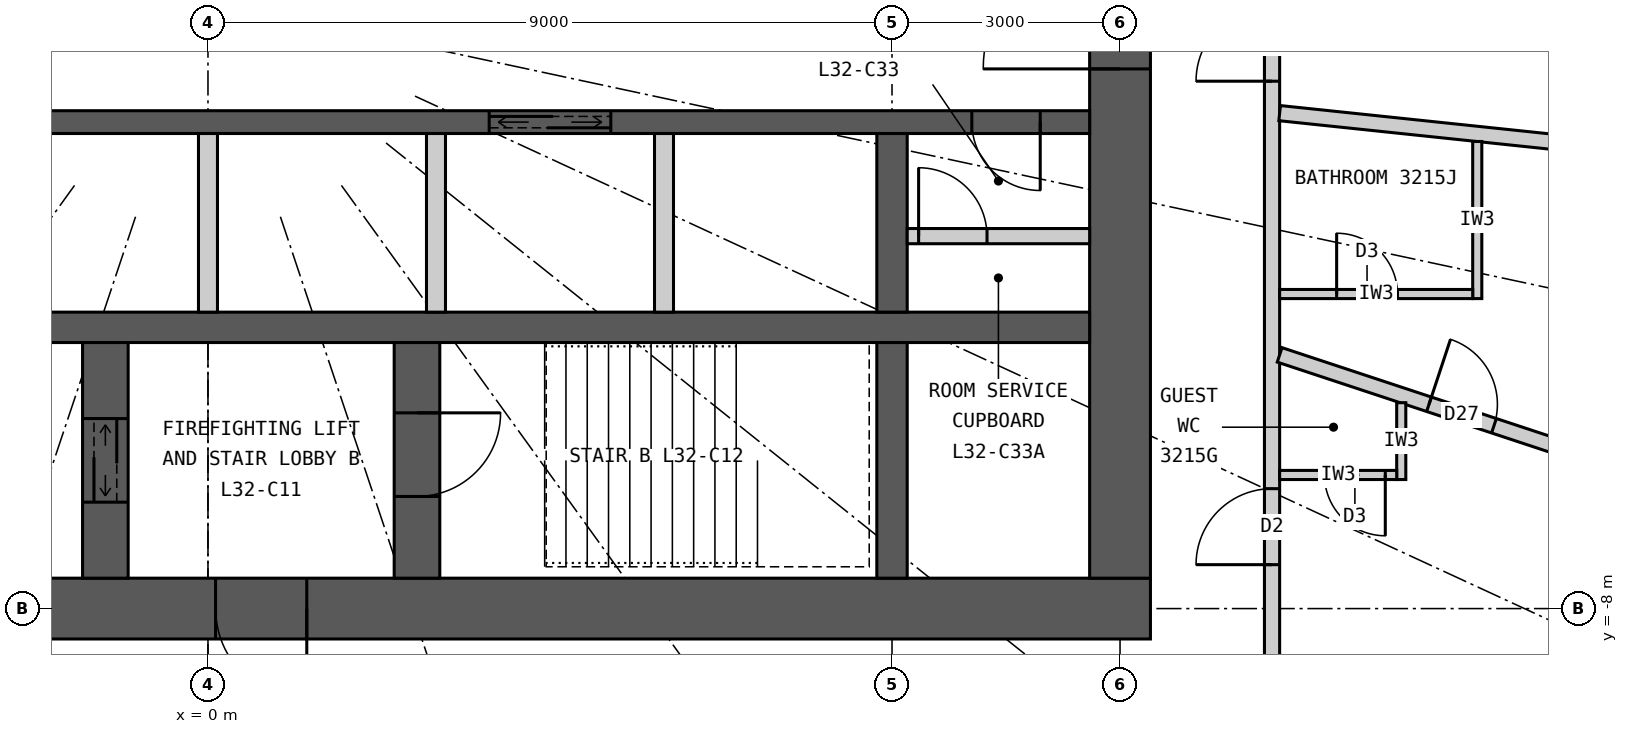
"""IFC4 building model, lengths in metres.
Left out: names, types, materials, properties, quantities, classifications, styles, units other than length and angle.
Written with IfcOpenShell. Run it as: python <this file> out.ifc"""

import sys

from ifc_helpers import new_model, si_unit, direction, frame, frame_2d, origin, place, context, subcontext, project, spatial, rectangle, extrude, element, fill, save


model = new_model("IFC4")
c1 = context("Model", 3, precision=1e-05, world=origin(), true_north=direction((0.0, 1.0)))
c2 = subcontext(c1, "Body", "Model", "MODEL_VIEW")
j1 = project(units=[si_unit("LENGTHUNIT", "METRE"), si_unit("PLANEANGLEUNIT", "RADIAN")], contexts=[c1])
p1 = place(None, origin())
s1 = spatial("IfcSite", under=j1, at=p1, CompositionType="ELEMENT")
p2 = place(p1, origin())
s2 = spatial("IfcBuilding", under=s1, at=p2, CompositionType="ELEMENT")
p3 = place(p2, frame((0.0, 0.0, 125.4)))
s3 = spatial("IfcBuildingStorey", under=s2, at=p3, CompositionType="ELEMENT", Elevation=125.4)
p4 = place(p3, frame((12.4, -8.0, 0.0), z_axis=(0.0, 0.0, 1.0), x_axis=(-1.0, 0.0, 0.0)))
e1 = element("IfcWall", 1, at=p4, inside=s3, PredefinedType="SHEAR", context=c2, shape_type="SweptSolid", body=[
    extrude(rectangle(XDim=24.8, YDim=0.8, at=frame_2d((12.4, 0.0))), origin(), (0.0, 0.0, 1.0), 3.3),
])
p5 = place(p4, frame((11.1, 0.0, 0.0)))
e2 = element("IfcOpeningElement", 2, at=p5, cuts=e1, PredefinedType="OPENING", context=c2, shape_type="SweptSolid", body=[
    extrude(rectangle(XDim=1.2, YDim=2.2, at=frame_2d((0.6, 1.1))), frame((0.0, 0.41, 0.0), z_axis=(0.0, -1.0, 0.0), x_axis=(1.0, 0.0, 0.0)), (0.0, 0.0, 1.0), 0.82),
])
p6 = place(p4, frame((18.7, 0.0, 0.0)))
e3 = element("IfcOpeningElement", 3, at=p6, cuts=e1, PredefinedType="OPENING", context=c2, shape_type="SweptSolid", body=[
    extrude(rectangle(XDim=0.9, YDim=2.2, at=frame_2d((0.45, 1.1))), frame((0.0, 0.41, 0.0), z_axis=(0.0, -1.0, 0.0), x_axis=(1.0, 0.0, 0.0)), (0.0, 0.0, 1.0), 0.82),
])
p7 = place(p3, frame((12.0, -7.6, 0.0), z_axis=(0.0, 0.0, 1.0), x_axis=(0.0, 1.0, 0.0)))
e4 = element("IfcWall", 4, at=p7, inside=s3, PredefinedType="SHEAR", context=c2, shape_type="SweptSolid", body=[
    extrude(rectangle(XDim=15.2, YDim=0.8, at=frame_2d((7.6, 0.0))), origin(), (0.0, 0.0, 1.0), 3.3),
])
p8 = place(p7, frame((6.7, 0.0, 0.0)))
e5 = element("IfcOpeningElement", 5, at=p8, cuts=e4, PredefinedType="OPENING", context=c2, shape_type="SweptSolid", body=[
    extrude(rectangle(XDim=1.8, YDim=2.2, at=frame_2d((0.9, 1.1))), frame((0.0, 0.41, 0.0), z_axis=(0.0, -1.0, 0.0), x_axis=(1.0, 0.0, 0.0)), (0.0, 0.0, 1.0), 0.82),
])
p9 = place(p3, frame((-11.6, -4.3, 0.0), z_axis=(0.0, 0.0, 1.0), x_axis=(1.0, 0.0, 0.0)))
e6 = element("IfcWall", 6, at=p9, inside=s3, PredefinedType="SHEAR", context=c2, shape_type="SweptSolid", body=[
    extrude(rectangle(XDim=23.2, YDim=0.4, at=frame_2d((11.6, 0.0))), origin(), (0.0, 0.0, 1.0), 3.3),
])
p10 = place(p3, frame((-11.6, -1.6, 0.0), z_axis=(0.0, 0.0, 1.0), x_axis=(1.0, 0.0, 0.0)))
e7 = element("IfcWall", 7, at=p10, inside=s3, PredefinedType="SHEAR", context=c2, shape_type="SweptSolid", body=[
    extrude(rectangle(XDim=23.2, YDim=0.3, at=frame_2d((11.6, 0.0))), origin(), (0.0, 0.0, 1.0), 3.3),
])
p11 = place(p10, frame((6.55, 0.0, 0.0)))
e8 = element("IfcOpeningElement", 8, at=p11, cuts=e7, PredefinedType="OPENING", context=c2, shape_type="SweptSolid", body=[
    extrude(rectangle(XDim=1.1, YDim=2.2, at=frame_2d((0.55, 1.1))), frame((0.0, 0.16, 0.0), z_axis=(0.0, -1.0, 0.0), x_axis=(1.0, 0.0, 0.0)), (0.0, 0.0, 1.0), 0.32),
])
p12 = place(p10, frame((15.3, 0.0, 0.0)))
e9 = element("IfcOpeningElement", 9, at=p12, cuts=e7, PredefinedType="OPENING", context=c2, shape_type="SweptSolid", body=[
    extrude(rectangle(XDim=1.6, YDim=2.4, at=frame_2d((0.8, 1.2))), frame((0.0, 0.16, 0.0), z_axis=(0.0, -1.0, 0.0), x_axis=(1.0, 0.0, 0.0)), (0.0, 0.0, 1.0), 0.32),
])
p13 = place(p10, frame((0.65, 0.0, 0.0)))
e10 = element("IfcOpeningElement", 10, at=p13, cuts=e7, PredefinedType="OPENING", context=c2, shape_type="SweptSolid", body=[
    extrude(rectangle(XDim=0.9, YDim=2.2, at=frame_2d((0.45, 1.1))), frame((0.0, 0.16, 0.0), z_axis=(0.0, -1.0, 0.0), x_axis=(1.0, 0.0, 0.0)), (0.0, 0.0, 1.0), 0.32),
])
p14 = place(p10, frame((3.65, 0.0, 0.0)))
e11 = element("IfcOpeningElement", 11, at=p14, cuts=e7, PredefinedType="OPENING", context=c2, shape_type="SweptSolid", body=[
    extrude(rectangle(XDim=0.9, YDim=2.2, at=frame_2d((0.45, 1.1))), frame((0.0, 0.16, 0.0), z_axis=(0.0, -1.0, 0.0), x_axis=(1.0, 0.0, 0.0)), (0.0, 0.0, 1.0), 0.32),
])
p15 = place(p10, frame((21.65, 0.0, 0.0)))
e12 = element("IfcOpeningElement", 12, at=p15, cuts=e7, PredefinedType="OPENING", context=c2, shape_type="SweptSolid", body=[
    extrude(rectangle(XDim=0.9, YDim=2.2, at=frame_2d((0.45, 1.1))), frame((0.0, 0.16, 0.0), z_axis=(0.0, -1.0, 0.0), x_axis=(1.0, 0.0, 0.0)), (0.0, 0.0, 1.0), 0.32),
])
p16 = place(p3, frame((9.0, -4.1, 0.0), z_axis=(0.0, 0.0, 1.0), x_axis=(0.0, 1.0, 0.0)))
e13 = element("IfcWall", 13, at=p16, inside=s3, PredefinedType="SHEAR", context=c2, shape_type="SweptSolid", body=[
    extrude(rectangle(XDim=2.35, YDim=0.4, at=frame_2d((1.175, 0.0))), origin(), (0.0, 0.0, 1.0), 3.3),
])
p17 = place(p3, frame((9.0, -7.6, 0.0), z_axis=(0.0, 0.0, 1.0), x_axis=(0.0, 1.0, 0.0)))
e14 = element("IfcWall", 14, at=p17, inside=s3, PredefinedType="SHEAR", context=c2, shape_type="SweptSolid", body=[
    extrude(rectangle(XDim=3.1, YDim=0.4, at=frame_2d((1.55, 0.0))), origin(), (0.0, 0.0, 1.0), 3.3),
])
p18 = place(p3, frame((2.75, -7.6, 0.0), z_axis=(0.0, 0.0, 1.0), x_axis=(0.0, 1.0, 0.0)))
e15 = element("IfcWall", 15, at=p18, inside=s3, PredefinedType="SHEAR", context=c2, shape_type="SweptSolid", body=[
    extrude(rectangle(XDim=3.1, YDim=0.6, at=frame_2d((1.55, 0.0))), origin(), (0.0, 0.0, 1.0), 3.3),
])
p19 = place(p18, frame((1.075, 0.0, 0.0)))
e16 = element("IfcOpeningElement", 16, at=p19, cuts=e15, PredefinedType="OPENING", context=c2, shape_type="SweptSolid", body=[
    extrude(rectangle(XDim=1.1, YDim=2.2, at=frame_2d((0.55, 1.1))), frame((0.0, 0.31, 0.0), z_axis=(0.0, -1.0, 0.0), x_axis=(1.0, 0.0, 0.0)), (0.0, 0.0, 1.0), 0.62),
])
p20 = place(p3, frame((-1.35, -7.6, 0.0), z_axis=(0.0, 0.0, 1.0), x_axis=(0.0, 1.0, 0.0)))
e17 = element("IfcWall", 17, at=p20, inside=s3, PredefinedType="SHEAR", context=c2, shape_type="SweptSolid", body=[
    extrude(rectangle(XDim=3.1, YDim=0.6, at=frame_2d((1.55, 0.0))), origin(), (0.0, 0.0, 1.0), 3.3),
])
p21 = place(p20, frame((1.0, 0.0, 0.0)))
e18 = element("IfcOpeningElement", 18, at=p21, cuts=e17, PredefinedType="OPENING", context=c2, shape_type="SweptSolid", body=[
    extrude(rectangle(XDim=1.1, YDim=2.2, at=frame_2d((0.55, 1.1))), frame((0.0, 0.31, 0.0), z_axis=(0.0, -1.0, 0.0), x_axis=(1.0, 0.0, 0.0)), (0.0, 0.0, 1.0), 0.62),
])
for number, where, z_axis, x_axis in (
    (19, (0.0, -4.1, 0.0), (0.0, 0.0, 1.0), (0.0, 1.0, 0.0)),
    (20, (3.0, -4.1, 0.0), (0.0, 0.0, 1.0), (0.0, 1.0, 0.0)),
    (21, (6.0, -4.1, 0.0), (0.0, 0.0, 1.0), (0.0, 1.0, 0.0)),
):
    element("IfcWall", number, at=place(p3, frame(where, z_axis=z_axis, x_axis=x_axis)), inside=s3, PredefinedType="PARTITIONING", context=c2, shape_type="SweptSolid", body=[
        extrude(rectangle(XDim=2.35, YDim=0.25, at=frame_2d((1.175, 0.0))), origin(), (0.0, 0.0, 1.0), 3.3),
    ])
p22 = place(p3, frame((14.0, -9.9, 0.0), z_axis=(0.0, 0.0, 1.0), x_axis=(0.0, 1.0, 0.0)))
e22 = element("IfcWall", 22, at=p22, inside=s3, PredefinedType="PARTITIONING", context=c2, shape_type="SweptSolid", body=[
    extrude(rectangle(XDim=19.8, YDim=0.2, at=frame_2d((9.9, 0.0))), origin(), (0.0, 0.0, 1.0), 3.12),
])
p23 = place(p22, frame((2.478, 0.0, 0.0)))
e23 = element("IfcOpeningElement", 23, at=p23, cuts=e22, PredefinedType="OPENING", context=c2, shape_type="SweptSolid", body=[
    extrude(rectangle(XDim=1.0, YDim=2.2, at=frame_2d((0.5, 1.1))), frame((0.0, 0.11, 0.0), z_axis=(0.0, -1.0, 0.0), x_axis=(1.0, 0.0, 0.0)), (0.0, 0.0, 1.0), 0.22),
])
p24 = place(p22, frame((8.838, 0.0, 0.0)))
e24 = element("IfcOpeningElement", 24, at=p24, cuts=e22, PredefinedType="OPENING", context=c2, shape_type="SweptSolid", body=[
    extrude(rectangle(XDim=1.0, YDim=2.2, at=frame_2d((0.5, 1.1))), frame((0.0, 0.11, 0.0), z_axis=(0.0, -1.0, 0.0), x_axis=(1.0, 0.0, 0.0)), (0.0, 0.0, 1.0), 0.22),
])
p25 = place(p22, frame((13.742, 0.0, 0.0)))
e25 = element("IfcOpeningElement", 25, at=p25, cuts=e22, PredefinedType="OPENING", context=c2, shape_type="SweptSolid", body=[
    extrude(rectangle(XDim=1.0, YDim=2.2, at=frame_2d((0.5, 1.1))), frame((0.0, 0.11, 0.0), z_axis=(0.0, -1.0, 0.0), x_axis=(1.0, 0.0, 0.0)), (0.0, 0.0, 1.0), 0.22),
])
p26 = place(p22, frame((18.698, 0.0, 0.0)))
e26 = element("IfcOpeningElement", 26, at=p26, cuts=e22, PredefinedType="OPENING", context=c2, shape_type="SweptSolid", body=[
    extrude(rectangle(XDim=1.0, YDim=2.2, at=frame_2d((0.5, 1.1))), frame((0.0, 0.11, 0.0), z_axis=(0.0, -1.0, 0.0), x_axis=(1.0, 0.0, 0.0)), (0.0, 0.0, 1.0), 0.22),
])
p27 = place(p3, frame((14.1, -4.662, 0.0), z_axis=(0.0, 0.0, 1.0), x_axis=(0.949446466373, -0.313928984789, 0.0)))
e27 = element("IfcWall", 27, at=p27, inside=s3, PredefinedType="PARTITIONING", context=c2, shape_type="SweptSolid", body=[
    extrude(rectangle(XDim=8.797, YDim=0.2, at=frame_2d((4.399, 0.0))), origin(), (0.0, 0.0, 1.0), 3.12),
])
p28 = place(p27, frame((2.07, 0.0, 0.0)))
e28 = element("IfcOpeningElement", 28, at=p28, cuts=e27, PredefinedType="OPENING", context=c2, shape_type="SweptSolid", body=[
    extrude(rectangle(XDim=0.9, YDim=2.1, at=frame_2d((0.45, 1.05))), frame((0.0, 0.11, 0.0), z_axis=(0.0, -1.0, 0.0), x_axis=(1.0, 0.0, 0.0)), (0.0, 0.0, 1.0), 0.22),
])
p29 = place(p3, frame((14.1, -1.482, 0.0), z_axis=(0.0, 0.0, 1.0), x_axis=(0.994523202615, -0.104516024894, 0.0)))
e29 = element("IfcWall", 29, at=p29, inside=s3, PredefinedType="PARTITIONING", context=c2, shape_type="SweptSolid", body=[
    extrude(rectangle(XDim=10.091, YDim=0.2, at=frame_2d((5.045, 0.0))), origin(), (0.0, 0.0, 1.0), 2.47),
])
p30 = place(p3, frame((15.7, -5.291, 0.0), z_axis=(0.0, 0.0, 1.0), x_axis=(0.0, -1.0, 0.0)))
e30 = element("IfcWall", 30, at=p30, inside=s3, PredefinedType="PARTITIONING", context=c2, shape_type="SweptSolid", body=[
    extrude(rectangle(XDim=1.011, YDim=0.12, at=frame_2d((0.505, 0.0))), origin(), (0.0, 0.0, 1.0), 3.12),
])
p31 = place(p3, frame((14.1, -6.242, 0.0), z_axis=(0.0, 0.0, 1.0), x_axis=(1.0, 0.0, 0.0)))
e31 = element("IfcWall", 31, at=p31, inside=s3, PredefinedType="PARTITIONING", context=c2, shape_type="SweptSolid", body=[
    extrude(rectangle(XDim=1.54, YDim=0.12, at=frame_2d((0.77, 0.0))), origin(), (0.0, 0.0, 1.0), 3.12),
])
p32 = place(p31, frame((0.59, 0.0, 0.0)))
e32 = element("IfcOpeningElement", 32, at=p32, cuts=e31, PredefinedType="OPENING", context=c2, shape_type="SweptSolid", body=[
    extrude(rectangle(XDim=0.8, YDim=2.1, at=frame_2d((0.4, 1.05))), frame((0.0, 0.07, 0.0), z_axis=(0.0, -1.0, 0.0), x_axis=(1.0, 0.0, 0.0)), (0.0, 0.0, 1.0), 0.14),
])
p33 = place(p3, frame((16.7, -1.855, 0.0), z_axis=(0.0, 0.0, 1.0), x_axis=(0.0, -1.0, 0.0)))
e33 = element("IfcWall", 33, at=p33, inside=s3, PredefinedType="PARTITIONING", context=c2, shape_type="SweptSolid", body=[
    extrude(rectangle(XDim=2.067, YDim=0.12, at=frame_2d((1.033, 0.0))), origin(), (0.0, 0.0, 1.0), 3.12),
])
p34 = place(p3, frame((14.1, -3.862, 0.0), z_axis=(0.0, 0.0, 1.0), x_axis=(1.0, 0.0, 0.0)))
e34 = element("IfcWall", 34, at=p34, inside=s3, PredefinedType="PARTITIONING", context=c2, shape_type="SweptSolid", body=[
    extrude(rectangle(XDim=2.54, YDim=0.12, at=frame_2d((1.27, 0.0))), origin(), (0.0, 0.0, 1.0), 2.37),
])
p35 = place(p34, frame((0.75, 0.0, 0.0)))
e35 = element("IfcOpeningElement", 35, at=p35, cuts=e34, PredefinedType="OPENING", context=c2, shape_type="SweptSolid", body=[
    extrude(rectangle(XDim=0.8, YDim=2.1, at=frame_2d((0.4, 1.05))), frame((0.0, 0.07, 0.0), z_axis=(0.0, -1.0, 0.0), x_axis=(1.0, 0.0, 0.0)), (0.0, 0.0, 1.0), 0.14),
])
p36 = place(p3, frame((9.2, -3.1, 0.0), z_axis=(0.0, 0.0, 1.0), x_axis=(1.0, 0.0, 0.0)))
e36 = element("IfcWall", 36, at=p36, inside=s3, PredefinedType="PARTITIONING", context=c2, shape_type="SweptSolid", body=[
    extrude(rectangle(XDim=2.4, YDim=0.2, at=frame_2d((1.2, 0.0))), origin(), (0.0, 0.0, 1.0), 3.12),
])
p37 = place(p36, frame((0.15, 0.0, 0.0)))
e37 = element("IfcOpeningElement", 37, at=p37, cuts=e36, PredefinedType="OPENING", context=c2, shape_type="SweptSolid", body=[
    extrude(rectangle(XDim=0.9, YDim=2.2, at=frame_2d((0.45, 1.1))), frame((0.0, 0.11, 0.0), z_axis=(0.0, -1.0, 0.0), x_axis=(1.0, 0.0, 0.0)), (0.0, 0.0, 1.0), 0.22),
])
p38 = place(p32, origin())
e38 = element("IfcDoor", 38, at=p38, inside=s3, OperationType="SINGLE_SWING_RIGHT", PredefinedType="DOOR", context=c2, shape_type="SweptSolid", body=[
    extrude(rectangle(XDim=0.8, YDim=2.1, at=frame_2d((0.4, 1.05))), frame((0.0, 0.025, 0.0), z_axis=(0.0, -1.0, 0.0), x_axis=(1.0, 0.0, 0.0)), (0.0, 0.0, 1.0), 0.05),
])
fill(e32, e38)
p39 = place(p23, origin())
e39 = element("IfcDoor", 39, at=p39, inside=s3, OperationType="SINGLE_SWING_LEFT", PredefinedType="DOOR", context=c2, shape_type="SweptSolid", body=[
    extrude(rectangle(XDim=1.0, YDim=2.2, at=frame_2d((0.5, 1.1))), frame((0.0, 0.025, 0.0), z_axis=(0.0, -1.0, 0.0), x_axis=(1.0, 0.0, 0.0)), (0.0, 0.0, 1.0), 0.05),
])
fill(e23, e39)
p40 = place(p35, origin())
e40 = element("IfcDoor", 40, at=p40, inside=s3, OperationType="SINGLE_SWING_LEFT", PredefinedType="DOOR", context=c2, shape_type="SweptSolid", body=[
    extrude(rectangle(XDim=0.8, YDim=2.1, at=frame_2d((0.4, 1.05))), frame((0.0, 0.025, 0.0), z_axis=(0.0, -1.0, 0.0), x_axis=(1.0, 0.0, 0.0)), (0.0, 0.0, 1.0), 0.05),
])
fill(e35, e40)
p41 = place(p28, origin())
e41 = element("IfcDoor", 41, at=p41, inside=s3, OperationType="SINGLE_SWING_LEFT", PredefinedType="DOOR", context=c2, shape_type="SweptSolid", body=[
    extrude(rectangle(XDim=0.9, YDim=2.1, at=frame_2d((0.45, 1.05))), frame((0.0, 0.025, 0.0), z_axis=(0.0, -1.0, 0.0), x_axis=(1.0, 0.0, 0.0)), (0.0, 0.0, 1.0), 0.05),
])
fill(e28, e41)
p42 = place(p24, origin())
e42 = element("IfcDoor", 42, at=p42, inside=s3, OperationType="SINGLE_SWING_LEFT", PredefinedType="DOOR", context=c2, shape_type="SweptSolid", body=[
    extrude(rectangle(XDim=1.0, YDim=2.2, at=frame_2d((0.5, 1.1))), frame((0.0, 0.025, 0.0), z_axis=(0.0, -1.0, 0.0), x_axis=(1.0, 0.0, 0.0)), (0.0, 0.0, 1.0), 0.05),
])
fill(e24, e42)
p43 = place(p5, origin())
e43 = element("IfcDoor", 43, at=p43, inside=s3, OperationType="SINGLE_SWING_LEFT", PredefinedType="DOOR", context=c2, shape_type="SweptSolid", body=[
    extrude(rectangle(XDim=1.2, YDim=2.2, at=frame_2d((0.6, 1.1))), frame((0.0, 0.025, 0.0), z_axis=(0.0, -1.0, 0.0), x_axis=(1.0, 0.0, 0.0)), (0.0, 0.0, 1.0), 0.05),
])
fill(e2, e43)
p44 = place(p19, origin())
e44 = element("IfcDoor", 44, at=p44, inside=s3, OperationType="SINGLE_SWING_RIGHT", PredefinedType="DOOR", context=c2, shape_type="SweptSolid", body=[
    extrude(rectangle(XDim=1.1, YDim=2.2, at=frame_2d((0.55, 1.1))), frame((0.0, 0.025, 0.0), z_axis=(0.0, -1.0, 0.0), x_axis=(1.0, 0.0, 0.0)), (0.0, 0.0, 1.0), 0.05),
])
fill(e16, e44)
p45 = place(p21, origin())
e45 = element("IfcDoor", 45, at=p45, inside=s3, OperationType="DOUBLE_DOOR_SLIDING", PredefinedType="DOOR", context=c2, shape_type="SweptSolid", body=[
    extrude(rectangle(XDim=1.1, YDim=2.2, at=frame_2d((0.55, 1.1))), frame((0.0, 0.025, 0.0), z_axis=(0.0, -1.0, 0.0), x_axis=(1.0, 0.0, 0.0)), (0.0, 0.0, 1.0), 0.05),
])
fill(e18, e45)
p46 = place(p12, origin())
e46 = element("IfcDoor", 46, at=p46, inside=s3, OperationType="DOUBLE_DOOR_SLIDING", PredefinedType="DOOR", context=c2, shape_type="SweptSolid", body=[
    extrude(rectangle(XDim=1.6, YDim=2.4, at=frame_2d((0.8, 1.2))), frame((0.0, 0.025, 0.0), z_axis=(0.0, -1.0, 0.0), x_axis=(1.0, 0.0, 0.0)), (0.0, 0.0, 1.0), 0.05),
])
fill(e9, e46)
p47 = place(p15, origin())
e47 = element("IfcDoor", 47, at=p47, inside=s3, OperationType="SINGLE_SWING_RIGHT", PredefinedType="DOOR", context=c2, shape_type="SweptSolid", body=[
    extrude(rectangle(XDim=0.9, YDim=2.2, at=frame_2d((0.45, 1.1))), frame((0.0, 0.025, 0.0), z_axis=(0.0, -1.0, 0.0), x_axis=(1.0, 0.0, 0.0)), (0.0, 0.0, 1.0), 0.05),
])
fill(e12, e47)
p48 = place(p37, origin())
e48 = element("IfcDoor", 48, at=p48, inside=s3, OperationType="SINGLE_SWING_LEFT", PredefinedType="DOOR", context=c2, shape_type="SweptSolid", body=[
    extrude(rectangle(XDim=0.9, YDim=2.2, at=frame_2d((0.45, 1.1))), frame((0.0, 0.025, 0.0), z_axis=(0.0, -1.0, 0.0), x_axis=(1.0, 0.0, 0.0)), (0.0, 0.0, 1.0), 0.05),
])
fill(e37, e48)
p49 = place(p8, origin())
e49 = element("IfcDoor", 49, at=p49, inside=s3, OperationType="DOUBLE_DOOR_DOUBLE_SWING", PredefinedType="DOOR", context=c2, shape_type="SweptSolid", body=[
    extrude(rectangle(XDim=1.8, YDim=2.2, at=frame_2d((0.9, 1.1))), frame((0.0, 0.025, 0.0), z_axis=(0.0, -1.0, 0.0), x_axis=(1.0, 0.0, 0.0)), (0.0, 0.0, 1.0), 0.05),
])
fill(e5, e49)
save(model, sys.argv[1])
